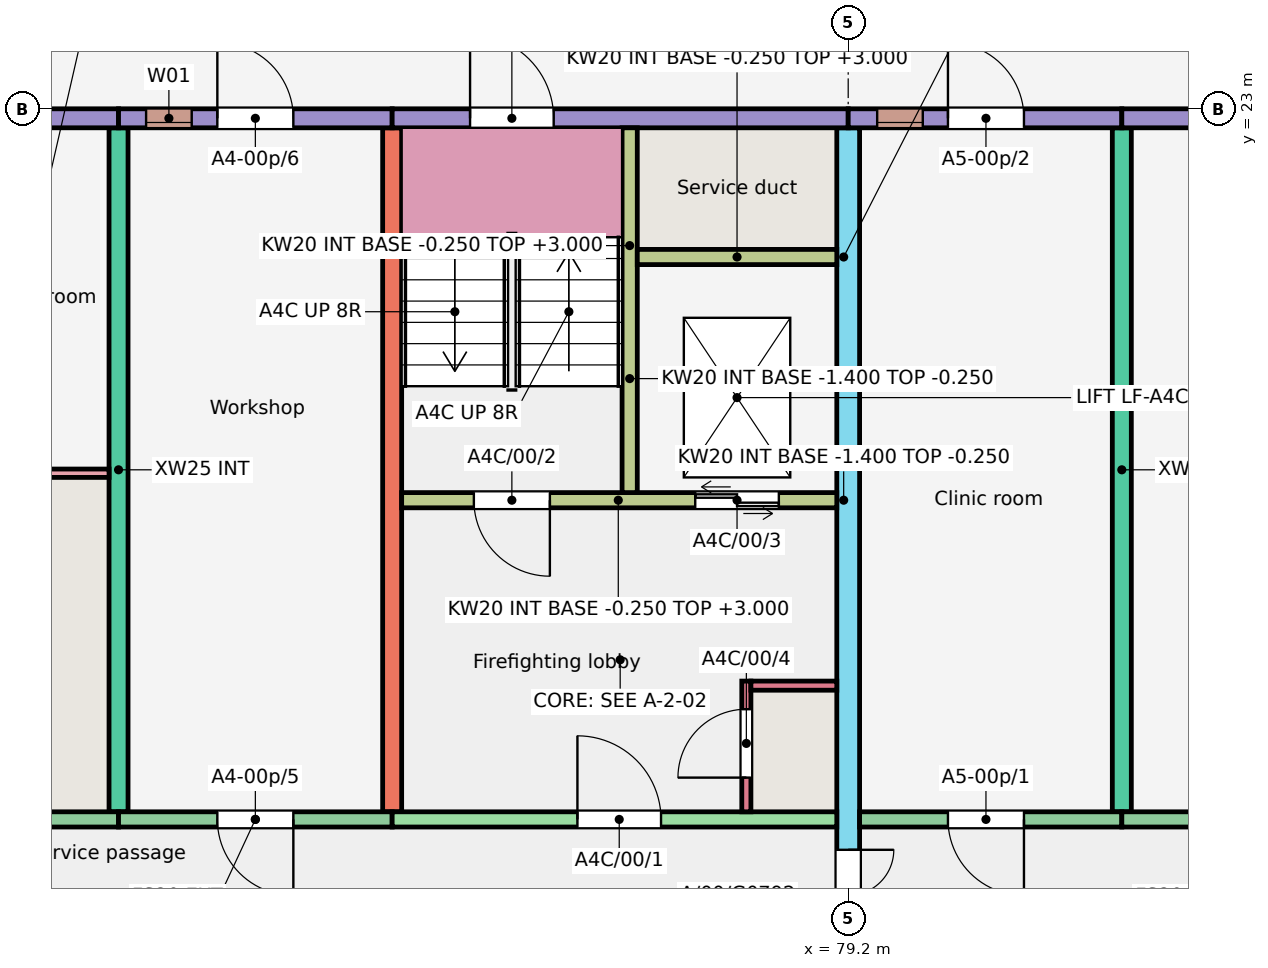
"""IFC4 building model, lengths in metres.
Left out: names, types, materials, properties, quantities, classifications, styles, units other than length and angle.
Written with IfcOpenShell. Run it as: python <this file> out.ifc"""

import sys

from ifc_helpers import new_model, si_unit, direction, frame, frame_2d, origin, place, context, subcontext, project, spatial, rectangle, extrude, element, fill, save


model = new_model("IFC4")
c1 = context("Model", 3, precision=1e-05, world=origin(), true_north=direction((0.0, 1.0)))
c2 = subcontext(c1, "Body", "Model", "MODEL_VIEW")
j1 = project(units=[si_unit("LENGTHUNIT", "METRE"), si_unit("PLANEANGLEUNIT", "RADIAN")], contexts=[c1])
p1 = place(None, origin())
s1 = spatial("IfcSite", under=j1, at=p1, CompositionType="ELEMENT")
p2 = place(p1, origin())
s2 = spatial("IfcBuilding", under=s1, at=p2, CompositionType="ELEMENT")
p3 = place(p2, origin())
s3 = spatial("IfcBuildingStorey", under=s2, at=p3, CompositionType="ELEMENT", Elevation=0.0)
for number, where, z_axis, x_axis in (
    (1, (69.6, 13.75, -0.25), (0.0, 0.0, 1.0), (0.0, 1.0, 0.0)),
    (2, (73.2, 13.75, -0.25), (0.0, 0.0, 1.0), (0.0, 1.0, 0.0)),
):
    element("IfcWall", number, at=place(p3, frame(where, z_axis=z_axis, x_axis=x_axis)), inside=s3, PredefinedType="SHEAR", context=c2, shape_type="SweptSolid", body=[
        extrude(rectangle(XDim=9.0, YDim=0.25, at=frame_2d((4.5, 0.0))), origin(), (0.0, 0.0, 1.0), 3.25),
    ])
p4 = place(p3, frame((79.2, 11.75, -0.25), z_axis=(0.0, 0.0, 1.0), x_axis=(0.0, 1.0, 0.0)))
e3 = element("IfcWall", 3, at=p4, inside=s3, PredefinedType="SHEAR", context=c2, shape_type="SweptSolid", body=[
    extrude(rectangle(XDim=11.0, YDim=0.3, at=frame_2d((5.5, 0.0))), origin(), (0.0, 0.0, 1.0), 3.25),
])
p5 = place(p4, frame((0.3, 0.0, 0.25)))
e4 = element("IfcOpeningElement", 4, at=p5, cuts=e3, PredefinedType="OPENING", context=c2, shape_type="SweptSolid", body=[
    extrude(rectangle(XDim=1.2, YDim=2.1, at=frame_2d((0.6, 1.05))), frame((0.0, 0.16, 0.0), z_axis=(0.0, -1.0, 0.0), x_axis=(1.0, 0.0, 0.0)), (0.0, 0.0, 1.0), 0.32),
])
p6 = place(p3, frame((82.8, 13.75, -0.25), z_axis=(0.0, 0.0, 1.0), x_axis=(0.0, 1.0, 0.0)))
e5 = element("IfcWall", 5, at=p6, inside=s3, PredefinedType="SHEAR", context=c2, shape_type="SweptSolid", body=[
    extrude(rectangle(XDim=9.0, YDim=0.25, at=frame_2d((4.5, 0.0))), origin(), (0.0, 0.0, 1.0), 3.25),
])
p7 = place(p3, frame((66.0, 22.875, -0.25), z_axis=(0.0, 0.0, 1.0), x_axis=(1.0, 0.0, 0.0)))
e6 = element("IfcWall", 6, at=p7, inside=s3, PredefinedType="SOLIDWALL", context=c2, shape_type="SweptSolid", body=[
    extrude(rectangle(XDim=3.6, YDim=0.25, at=frame_2d((1.8, 0.0))), origin(), (0.0, 0.0, 1.0), 3.25),
])
p8 = place(p7, frame((1.3, 0.0, 0.25)))
e7 = element("IfcOpeningElement", 7, at=p8, cuts=e6, PredefinedType="OPENING", context=c2, shape_type="SweptSolid", body=[
    extrude(rectangle(XDim=1.0, YDim=2.1, at=frame_2d((0.5, 1.05))), frame((0.0, 0.135, 0.0), z_axis=(0.0, -1.0, 0.0), x_axis=(1.0, 0.0, 0.0)), (0.0, 0.0, 1.0), 0.27),
])
p9 = place(p3, frame((66.0, 13.65, -0.25), z_axis=(0.0, 0.0, 1.0), x_axis=(1.0, 0.0, 0.0)))
e8 = element("IfcWall", 8, at=p9, inside=s3, PredefinedType="SOLIDWALL", context=c2, shape_type="SweptSolid", body=[
    extrude(rectangle(XDim=3.6, YDim=0.2, at=frame_2d((1.8, 0.0))), origin(), (0.0, 0.0, 1.0), 3.25),
])
p10 = place(p9, frame((1.3, 0.0, 0.25)))
e9 = element("IfcOpeningElement", 9, at=p10, cuts=e8, PredefinedType="OPENING", context=c2, shape_type="SweptSolid", body=[
    extrude(rectangle(XDim=1.0, YDim=2.1, at=frame_2d((0.5, 1.05))), frame((0.0, 0.11, 0.0), z_axis=(0.0, -1.0, 0.0), x_axis=(1.0, 0.0, 0.0)), (0.0, 0.0, 1.0), 0.22),
])
p11 = place(p3, frame((69.6, 22.875, -0.25), z_axis=(0.0, 0.0, 1.0), x_axis=(1.0, 0.0, 0.0)))
e10 = element("IfcWall", 10, at=p11, inside=s3, PredefinedType="SOLIDWALL", context=c2, shape_type="SweptSolid", body=[
    extrude(rectangle(XDim=3.6, YDim=0.25, at=frame_2d((1.8, 0.0))), origin(), (0.0, 0.0, 1.0), 3.25),
])
p12 = place(p11, frame((0.363, 0.0, 2.05)))
e11 = element("IfcOpeningElement", 11, at=p12, cuts=e10, PredefinedType="OPENING", context=c2, shape_type="SweptSolid", body=[
    extrude(rectangle(XDim=0.6, YDim=0.6, at=frame_2d((0.3, 0.3))), frame((0.0, 0.135, 0.0), z_axis=(0.0, -1.0, 0.0), x_axis=(1.0, 0.0, 0.0)), (0.0, 0.0, 1.0), 0.27),
])
p13 = place(p11, frame((1.3, 0.0, 0.25)))
e12 = element("IfcOpeningElement", 12, at=p13, cuts=e10, PredefinedType="OPENING", context=c2, shape_type="SweptSolid", body=[
    extrude(rectangle(XDim=1.0, YDim=2.1, at=frame_2d((0.5, 1.05))), frame((0.0, 0.135, 0.0), z_axis=(0.0, -1.0, 0.0), x_axis=(1.0, 0.0, 0.0)), (0.0, 0.0, 1.0), 0.27),
])
p14 = place(p3, frame((69.6, 13.65, -0.25), z_axis=(0.0, 0.0, 1.0), x_axis=(1.0, 0.0, 0.0)))
e13 = element("IfcWall", 13, at=p14, inside=s3, PredefinedType="SOLIDWALL", context=c2, shape_type="SweptSolid", body=[
    extrude(rectangle(XDim=3.6, YDim=0.2, at=frame_2d((1.8, 0.0))), origin(), (0.0, 0.0, 1.0), 3.25),
])
p15 = place(p14, frame((1.3, 0.0, 0.25)))
e14 = element("IfcOpeningElement", 14, at=p15, cuts=e13, PredefinedType="OPENING", context=c2, shape_type="SweptSolid", body=[
    extrude(rectangle(XDim=1.0, YDim=2.1, at=frame_2d((0.5, 1.05))), frame((0.0, 0.11, 0.0), z_axis=(0.0, -1.0, 0.0), x_axis=(1.0, 0.0, 0.0)), (0.0, 0.0, 1.0), 0.22),
])
p16 = place(p3, frame((73.2, 22.875, -0.25), z_axis=(0.0, 0.0, 1.0), x_axis=(1.0, 0.0, 0.0)))
e15 = element("IfcWall", 15, at=p16, inside=s3, PredefinedType="SOLIDWALL", context=c2, shape_type="SweptSolid", body=[
    extrude(rectangle(XDim=6.0, YDim=0.25, at=frame_2d((3.0, 0.0))), origin(), (0.0, 0.0, 1.0), 3.25),
])
p17 = place(p16, frame((1.025, 0.0, 0.25)))
e16 = element("IfcOpeningElement", 16, at=p17, cuts=e15, PredefinedType="OPENING", context=c2, shape_type="SweptSolid", body=[
    extrude(rectangle(XDim=1.1, YDim=2.1, at=frame_2d((0.55, 1.05))), frame((0.0, 0.135, 0.0), z_axis=(0.0, -1.0, 0.0), x_axis=(1.0, 0.0, 0.0)), (0.0, 0.0, 1.0), 0.27),
])
p18 = place(p3, frame((73.2, 13.65, -0.25), z_axis=(0.0, 0.0, 1.0), x_axis=(1.0, 0.0, 0.0)))
e17 = element("IfcWall", 17, at=p18, inside=s3, PredefinedType="SHEAR", context=c2, shape_type="SweptSolid", body=[
    extrude(rectangle(XDim=5.85, YDim=0.2, at=frame_2d((2.925, 0.0))), origin(), (0.0, 0.0, 1.0), 3.25),
])
p19 = place(p18, frame((2.438, 0.0, 0.25)))
e18 = element("IfcOpeningElement", 18, at=p19, cuts=e17, PredefinedType="OPENING", context=c2, shape_type="SweptSolid", body=[
    extrude(rectangle(XDim=1.1, YDim=2.1, at=frame_2d((0.55, 1.05))), frame((0.0, 0.11, 0.0), z_axis=(0.0, -1.0, 0.0), x_axis=(1.0, 0.0, 0.0)), (0.0, 0.0, 1.0), 0.22),
])
p20 = place(p3, frame((73.325, 17.85, -0.25), z_axis=(0.0, 0.0, 1.0), x_axis=(1.0, 0.0, 0.0)))
e19 = element("IfcWall", 19, at=p20, inside=s3, PredefinedType="SHEAR", context=c2, shape_type="SweptSolid", body=[
    extrude(rectangle(XDim=5.725, YDim=0.2, at=frame_2d((2.863, 0.0))), origin(), (0.0, 0.0, 1.0), 3.25),
])
p21 = place(p20, frame((0.95, 0.0, 0.25)))
e20 = element("IfcOpeningElement", 20, at=p21, cuts=e19, PredefinedType="OPENING", context=c2, shape_type="SweptSolid", body=[
    extrude(rectangle(XDim=1.0, YDim=2.1, at=frame_2d((0.5, 1.05))), frame((0.0, 0.11, 0.0), z_axis=(0.0, -1.0, 0.0), x_axis=(1.0, 0.0, 0.0)), (0.0, 0.0, 1.0), 0.22),
])
p22 = place(p20, frame((3.863, 0.0, 0.25)))
e21 = element("IfcOpeningElement", 21, at=p22, cuts=e19, PredefinedType="OPENING", context=c2, shape_type="SweptSolid", body=[
    extrude(rectangle(XDim=1.1, YDim=2.1, at=frame_2d((0.55, 1.05))), frame((0.0, 0.11, 0.0), z_axis=(0.0, -1.0, 0.0), x_axis=(1.0, 0.0, 0.0)), (0.0, 0.0, 1.0), 0.22),
])
p23 = place(p3, frame((76.325, 17.95, -0.25), z_axis=(0.0, 0.0, 1.0), x_axis=(0.0, 1.0, 0.0)))
e22 = element("IfcWall", 22, at=p23, inside=s3, PredefinedType="SHEAR", context=c2, shape_type="SweptSolid", body=[
    extrude(rectangle(XDim=4.8, YDim=0.2, at=frame_2d((2.4, 0.0))), origin(), (0.0, 0.0, 1.0), 3.25),
])
p24 = place(p3, frame((76.425, 21.05, -0.25), z_axis=(0.0, 0.0, 1.0), x_axis=(1.0, 0.0, 0.0)))
e23 = element("IfcWall", 23, at=p24, inside=s3, PredefinedType="SHEAR", context=c2, shape_type="SweptSolid", body=[
    extrude(rectangle(XDim=2.625, YDim=0.2, at=frame_2d((1.312, 0.0))), origin(), (0.0, 0.0, 1.0), 3.25),
])
p25 = place(p3, frame((77.86, 13.75, -0.25), z_axis=(0.0, 0.0, 1.0), x_axis=(0.0, 1.0, 0.0)))
e24 = element("IfcWall", 24, at=p25, inside=s3, PredefinedType="SHEAR", context=c2, shape_type="SweptSolid", body=[
    extrude(rectangle(XDim=1.72, YDim=0.12, at=frame_2d((0.86, 0.0))), origin(), (0.0, 0.0, 1.0), 3.25),
])
p26 = place(p25, frame((0.45, 0.0, 0.25)))
e25 = element("IfcOpeningElement", 25, at=p26, cuts=e24, PredefinedType="OPENING", context=c2, shape_type="SweptSolid", body=[
    extrude(rectangle(XDim=0.9, YDim=2.1, at=frame_2d((0.45, 1.05))), frame((0.0, 0.07, 0.0), z_axis=(0.0, -1.0, 0.0), x_axis=(1.0, 0.0, 0.0)), (0.0, 0.0, 1.0), 0.14),
])
p27 = place(p3, frame((77.92, 15.41, -0.25), z_axis=(0.0, 0.0, 1.0), x_axis=(1.0, 0.0, 0.0)))
e26 = element("IfcWall", 26, at=p27, inside=s3, PredefinedType="SHEAR", context=c2, shape_type="SweptSolid", body=[
    extrude(rectangle(XDim=1.13, YDim=0.12, at=frame_2d((0.565, 0.0))), origin(), (0.0, 0.0, 1.0), 3.25),
])
p28 = place(p3, frame((79.2, 22.875, -0.25), z_axis=(0.0, 0.0, 1.0), x_axis=(1.0, 0.0, 0.0)))
e27 = element("IfcWall", 27, at=p28, inside=s3, PredefinedType="SOLIDWALL", context=c2, shape_type="SweptSolid", body=[
    extrude(rectangle(XDim=3.6, YDim=0.25, at=frame_2d((1.8, 0.0))), origin(), (0.0, 0.0, 1.0), 3.25),
])
p29 = place(p28, frame((0.381, 0.0, 2.05)))
e28 = element("IfcOpeningElement", 28, at=p29, cuts=e27, PredefinedType="OPENING", context=c2, shape_type="SweptSolid", body=[
    extrude(rectangle(XDim=0.6, YDim=0.6, at=frame_2d((0.3, 0.3))), frame((0.0, 0.135, 0.0), z_axis=(0.0, -1.0, 0.0), x_axis=(1.0, 0.0, 0.0)), (0.0, 0.0, 1.0), 0.27),
])
p30 = place(p28, frame((1.312, 0.0, 0.25)))
e29 = element("IfcOpeningElement", 29, at=p30, cuts=e27, PredefinedType="OPENING", context=c2, shape_type="SweptSolid", body=[
    extrude(rectangle(XDim=1.0, YDim=2.1, at=frame_2d((0.5, 1.05))), frame((0.0, 0.135, 0.0), z_axis=(0.0, -1.0, 0.0), x_axis=(1.0, 0.0, 0.0)), (0.0, 0.0, 1.0), 0.27),
])
p31 = place(p3, frame((79.35, 13.65, -0.25), z_axis=(0.0, 0.0, 1.0), x_axis=(1.0, 0.0, 0.0)))
e30 = element("IfcWall", 30, at=p31, inside=s3, PredefinedType="SOLIDWALL", context=c2, shape_type="SweptSolid", body=[
    extrude(rectangle(XDim=3.45, YDim=0.2, at=frame_2d((1.725, 0.0))), origin(), (0.0, 0.0, 1.0), 3.25),
])
p32 = place(p31, frame((1.163, 0.0, 0.25)))
e31 = element("IfcOpeningElement", 31, at=p32, cuts=e30, PredefinedType="OPENING", context=c2, shape_type="SweptSolid", body=[
    extrude(rectangle(XDim=1.0, YDim=2.1, at=frame_2d((0.5, 1.05))), frame((0.0, 0.11, 0.0), z_axis=(0.0, -1.0, 0.0), x_axis=(1.0, 0.0, 0.0)), (0.0, 0.0, 1.0), 0.22),
])
p33 = place(p3, frame((82.8, 22.875, -0.25), z_axis=(0.0, 0.0, 1.0), x_axis=(1.0, 0.0, 0.0)))
e32 = element("IfcWall", 32, at=p33, inside=s3, PredefinedType="SOLIDWALL", context=c2, shape_type="SweptSolid", body=[
    extrude(rectangle(XDim=3.6, YDim=0.25, at=frame_2d((1.8, 0.0))), origin(), (0.0, 0.0, 1.0), 3.25),
])
p34 = place(p33, frame((2.637, 0.0, 2.05)))
e33 = element("IfcOpeningElement", 33, at=p34, cuts=e32, PredefinedType="OPENING", context=c2, shape_type="SweptSolid", body=[
    extrude(rectangle(XDim=0.6, YDim=0.6, at=frame_2d((0.3, 0.3))), frame((0.0, 0.135, 0.0), z_axis=(0.0, -1.0, 0.0), x_axis=(1.0, 0.0, 0.0)), (0.0, 0.0, 1.0), 0.27),
])
p35 = place(p33, frame((1.3, 0.0, 0.25)))
e34 = element("IfcOpeningElement", 34, at=p35, cuts=e32, PredefinedType="OPENING", context=c2, shape_type="SweptSolid", body=[
    extrude(rectangle(XDim=1.0, YDim=2.1, at=frame_2d((0.5, 1.05))), frame((0.0, 0.135, 0.0), z_axis=(0.0, -1.0, 0.0), x_axis=(1.0, 0.0, 0.0)), (0.0, 0.0, 1.0), 0.27),
])
p36 = place(p3, frame((82.8, 13.65, -0.25), z_axis=(0.0, 0.0, 1.0), x_axis=(1.0, 0.0, 0.0)))
e35 = element("IfcWall", 35, at=p36, inside=s3, PredefinedType="SOLIDWALL", context=c2, shape_type="SweptSolid", body=[
    extrude(rectangle(XDim=3.6, YDim=0.2, at=frame_2d((1.8, 0.0))), origin(), (0.0, 0.0, 1.0), 3.25),
])
p37 = place(p36, frame((1.3, 0.0, 0.25)))
e36 = element("IfcOpeningElement", 36, at=p37, cuts=e35, PredefinedType="OPENING", context=c2, shape_type="SweptSolid", body=[
    extrude(rectangle(XDim=1.0, YDim=2.1, at=frame_2d((0.5, 1.05))), frame((0.0, 0.11, 0.0), z_axis=(0.0, -1.0, 0.0), x_axis=(1.0, 0.0, 0.0)), (0.0, 0.0, 1.0), 0.22),
])
for number, where, z_axis, x_axis in (
    (37, (76.225, 17.85, -1.4), (0.0, 0.0, 1.0), (1.0, 0.0, 0.0)),
    (38, (76.225, 21.05, -1.4), (0.0, 0.0, 1.0), (1.0, 0.0, 0.0)),
):
    element("IfcWall", number, at=place(p3, frame(where, z_axis=z_axis, x_axis=x_axis)), inside=s3, PredefinedType="SHEAR", context=c2, shape_type="SweptSolid", body=[
        extrude(rectangle(XDim=2.975, YDim=0.2, at=frame_2d((1.487, 0.0))), origin(), (0.0, 0.0, 1.0), 1.15),
    ])
p38 = place(p3, frame((76.325, 17.95, -1.4), z_axis=(0.0, 0.0, 1.0), x_axis=(0.0, 1.0, 0.0)))
e39 = element("IfcWall", 39, at=p38, inside=s3, PredefinedType="SHEAR", context=c2, shape_type="SweptSolid", body=[
    extrude(rectangle(XDim=3.0, YDim=0.2, at=frame_2d((1.5, 0.0))), origin(), (0.0, 0.0, 1.0), 1.15),
])
p39 = place(p3, frame((79.125, 17.95, -1.4), z_axis=(0.0, 0.0, 1.0), x_axis=(0.0, 1.0, 0.0)))
e40 = element("IfcWall", 40, at=p39, inside=s3, PredefinedType="SHEAR", context=c2, shape_type="SweptSolid", body=[
    extrude(rectangle(XDim=3.0, YDim=0.15, at=frame_2d((1.5, 0.0))), origin(), (0.0, 0.0, 1.0), 1.15),
])
p40 = place(p3, frame((66.125, 18.205, 0.0), z_axis=(0.0, 0.0, 1.0), x_axis=(1.0, 0.0, 0.0)))
e41 = element("IfcWall", 41, at=p40, inside=s3, PredefinedType="PARTITIONING", context=c2, shape_type="SweptSolid", body=[
    extrude(rectangle(XDim=3.35, YDim=0.11, at=frame_2d((1.675, 0.0))), origin(), (0.0, 0.0, 1.0), 2.8),
])
p41 = place(p12, origin())
e42 = element("IfcWindow", 42, at=p41, inside=s3, PartitioningType="SINGLE_PANEL", PredefinedType="WINDOW", context=c2, shape_type="SweptSolid", body=[
    extrude(rectangle(XDim=0.6, YDim=0.6, at=frame_2d((0.3, 0.3))), frame((0.0, -0.025, 0.0), z_axis=(0.0, -1.0, 0.0), x_axis=(1.0, 0.0, 0.0)), (0.0, 0.0, 1.0), 0.06),
])
fill(e11, e42)
p42 = place(p29, origin())
e43 = element("IfcWindow", 43, at=p42, inside=s3, PartitioningType="SINGLE_PANEL", PredefinedType="WINDOW", context=c2, shape_type="SweptSolid", body=[
    extrude(rectangle(XDim=0.6, YDim=0.6, at=frame_2d((0.3, 0.3))), frame((0.0, -0.025, 0.0), z_axis=(0.0, -1.0, 0.0), x_axis=(1.0, 0.0, 0.0)), (0.0, 0.0, 1.0), 0.06),
])
fill(e28, e43)
p43 = place(p15, origin())
e44 = element("IfcDoor", 44, at=p43, inside=s3, OperationType="SINGLE_SWING_RIGHT", PredefinedType="DOOR", context=c2, shape_type="SweptSolid", body=[
    extrude(rectangle(XDim=1.0, YDim=2.1, at=frame_2d((0.5, 1.05))), frame((0.0, 0.025, 0.0), z_axis=(0.0, -1.0, 0.0), x_axis=(1.0, 0.0, 0.0)), (0.0, 0.0, 1.0), 0.05),
])
fill(e14, e44)
p44 = place(p13, origin())
e45 = element("IfcDoor", 45, at=p44, inside=s3, OperationType="SINGLE_SWING_LEFT", PredefinedType="DOOR", context=c2, shape_type="SweptSolid", body=[
    extrude(rectangle(XDim=1.0, YDim=2.1, at=frame_2d((0.5, 1.05))), frame((0.0, 0.025, 0.0), z_axis=(0.0, -1.0, 0.0), x_axis=(1.0, 0.0, 0.0)), (0.0, 0.0, 1.0), 0.05),
])
fill(e12, e45)
p45 = place(p32, origin())
e46 = element("IfcDoor", 46, at=p45, inside=s3, OperationType="SINGLE_SWING_RIGHT", PredefinedType="DOOR", context=c2, shape_type="SweptSolid", body=[
    extrude(rectangle(XDim=1.0, YDim=2.1, at=frame_2d((0.5, 1.05))), frame((0.0, 0.025, 0.0), z_axis=(0.0, -1.0, 0.0), x_axis=(1.0, 0.0, 0.0)), (0.0, 0.0, 1.0), 0.05),
])
fill(e31, e46)
p46 = place(p30, origin())
e47 = element("IfcDoor", 47, at=p46, inside=s3, OperationType="SINGLE_SWING_LEFT", PredefinedType="DOOR", context=c2, shape_type="SweptSolid", body=[
    extrude(rectangle(XDim=1.0, YDim=2.1, at=frame_2d((0.5, 1.05))), frame((0.0, 0.025, 0.0), z_axis=(0.0, -1.0, 0.0), x_axis=(1.0, 0.0, 0.0)), (0.0, 0.0, 1.0), 0.05),
])
fill(e29, e47)
p47 = place(p19, origin())
e48 = element("IfcDoor", 48, at=p47, inside=s3, OperationType="SINGLE_SWING_LEFT", PredefinedType="DOOR", context=c2, shape_type="SweptSolid", body=[
    extrude(rectangle(XDim=1.1, YDim=2.1, at=frame_2d((0.55, 1.05))), frame((0.0, 0.025, 0.0), z_axis=(0.0, -1.0, 0.0), x_axis=(1.0, 0.0, 0.0)), (0.0, 0.0, 1.0), 0.05),
])
fill(e18, e48)
p48 = place(p21, origin())
e49 = element("IfcDoor", 49, at=p48, inside=s3, OperationType="SINGLE_SWING_RIGHT", PredefinedType="DOOR", context=c2, shape_type="SweptSolid", body=[
    extrude(rectangle(XDim=1.0, YDim=2.1, at=frame_2d((0.5, 1.05))), frame((0.0, 0.025, 0.0), z_axis=(0.0, -1.0, 0.0), x_axis=(1.0, 0.0, 0.0)), (0.0, 0.0, 1.0), 0.05),
])
fill(e20, e49)
p49 = place(p22, origin())
e50 = element("IfcDoor", 50, at=p49, inside=s3, OperationType="DOUBLE_DOOR_SLIDING", PredefinedType="DOOR", context=c2, shape_type="SweptSolid", body=[
    extrude(rectangle(XDim=1.1, YDim=2.1, at=frame_2d((0.55, 1.05))), frame((0.0, 0.025, 0.0), z_axis=(0.0, -1.0, 0.0), x_axis=(1.0, 0.0, 0.0)), (0.0, 0.0, 1.0), 0.05),
])
fill(e21, e50)
p50 = place(p26, origin())
e51 = element("IfcDoor", 51, at=p50, inside=s3, OperationType="SINGLE_SWING_LEFT", PredefinedType="DOOR", context=c2, shape_type="SweptSolid", body=[
    extrude(rectangle(XDim=0.9, YDim=2.1, at=frame_2d((0.45, 1.05))), frame((0.0, 0.025, 0.0), z_axis=(0.0, -1.0, 0.0), x_axis=(1.0, 0.0, 0.0)), (0.0, 0.0, 1.0), 0.05),
])
fill(e25, e51)
p51 = place(p17, origin())
e52 = element("IfcDoor", 52, at=p51, inside=s3, OperationType="SINGLE_SWING_LEFT", PredefinedType="DOOR", context=c2, shape_type="SweptSolid", body=[
    extrude(rectangle(XDim=1.1, YDim=2.1, at=frame_2d((0.55, 1.05))), frame((0.0, 0.025, 0.0), z_axis=(0.0, -1.0, 0.0), x_axis=(1.0, 0.0, 0.0)), (0.0, 0.0, 1.0), 0.05),
])
fill(e16, e52)
p52 = place(p5, origin())
e53 = element("IfcDoor", 53, at=p52, inside=s3, OperationType="DOUBLE_DOOR_SINGLE_SWING", PredefinedType="DOOR", context=c2, shape_type="SweptSolid", body=[
    extrude(rectangle(XDim=1.2, YDim=2.1, at=frame_2d((0.6, 1.05))), frame((0.0, 0.025, 0.0), z_axis=(0.0, -1.0, 0.0), x_axis=(1.0, 0.0, 0.0)), (0.0, 0.0, 1.0), 0.05),
])
fill(e4, e53)
save(model, sys.argv[1])
